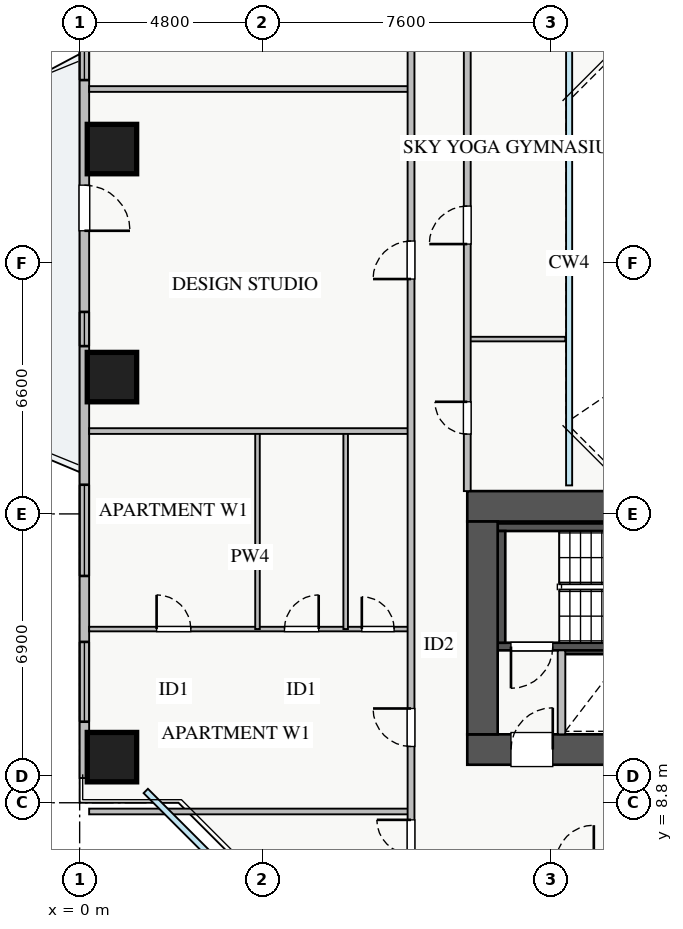
"""IFC4 building model, lengths in metres.
Left out: names, types, materials, properties, quantities, classifications, styles, units other than length and angle.
Written with IfcOpenShell. Run it as: python <this file> out.ifc"""

import sys

from ifc_helpers import new_model, si_unit, direction, frame, frame_2d, origin, origin_2d, place, context, subcontext, project, spatial, rectangle, extrude, source, transform, mapped, element, fill, save


model = new_model("IFC4")
c1 = context("Model", 3, precision=1e-05, world=origin(), true_north=direction((0.0, 1.0)))
c2 = subcontext(c1, "Body", "Model", "MODEL_VIEW")
j1 = project(units=[si_unit("LENGTHUNIT", "METRE"), si_unit("PLANEANGLEUNIT", "RADIAN")], contexts=[c1])
p1 = place(None, origin())
s1 = spatial("IfcSite", under=j1, at=p1, CompositionType="ELEMENT")
p2 = place(p1, origin())
s2 = spatial("IfcBuilding", under=s1, at=p2, CompositionType="ELEMENT")
p3 = place(p2, frame((0.0, 0.0, 89.25)))
s3 = spatial("IfcBuildingStorey", under=s2, at=p3, CompositionType="ELEMENT", Elevation=89.25)
p4 = place(p3, frame((12.68, 12.8, 0.0), z_axis=(0.0, 0.0, 1.0), x_axis=(1.0, 0.0, 0.0)))
e1 = element("IfcWall", 1, at=p4, inside=s3, PredefinedType="SHEAR", context=c2, shape_type="SweptSolid", body=[
    extrude(rectangle(XDim=1.94, YDim=0.18, at=frame_2d((0.97, 0.0))), origin(), (0.0, 0.0, 1.0), 3.03),
])
p5 = place(p3, frame((11.0, 12.91, 0.0), z_axis=(0.0, 0.0, 1.0), x_axis=(1.0, 0.0, 0.0)))
e2 = element("IfcWall", 2, at=p5, inside=s3, PredefinedType="SHEAR", context=c2, shape_type="SweptSolid", body=[
    extrude(rectangle(XDim=7.15, YDim=0.2, at=frame_2d((3.575, 0.0))), origin(), (0.0, 0.0, 1.0), 3.25),
])
p6 = place(p5, frame((0.35, 0.0, 0.0)))
e3 = element("IfcOpeningElement", 3, at=p6, cuts=e2, PredefinedType="OPENING", context=c2, shape_type="SweptSolid", body=[
    extrude(rectangle(XDim=1.1, YDim=2.05, at=frame_2d((0.55, 1.025))), frame((0.0, 0.11, 0.0), z_axis=(0.0, -1.0, 0.0), x_axis=(1.0, 0.0, 0.0)), (0.0, 0.0, 1.0), 0.22),
])
p7 = place(p3, frame((11.0, 16.05, 0.0), z_axis=(0.0, 0.0, 1.0), x_axis=(1.0, 0.0, 0.0)))
e4 = element("IfcWall", 4, at=p7, inside=s3, PredefinedType="SHEAR", context=c2, shape_type="SweptSolid", body=[
    extrude(rectangle(XDim=7.15, YDim=0.2, at=frame_2d((3.575, 0.0))), origin(), (0.0, 0.0, 1.0), 3.25),
])
p8 = place(p3, frame((11.1, 13.01, 0.0), z_axis=(0.0, 0.0, 1.0), x_axis=(0.0, 1.0, 0.0)))
e5 = element("IfcWall", 5, at=p8, inside=s3, PredefinedType="SHEAR", context=c2, shape_type="SweptSolid", body=[
    extrude(rectangle(XDim=2.94, YDim=0.2, at=frame_2d((1.47, 0.0))), origin(), (0.0, 0.0, 1.0), 3.25),
])
p9 = place(p3, frame((10.2, 10.2, 0.0), z_axis=(0.0, 0.0, 1.0), x_axis=(1.0, 0.0, 0.0)))
e6 = element("IfcWall", 6, at=p9, inside=s3, PredefinedType="SHEAR", context=c2, shape_type="SweptSolid", body=[
    extrude(rectangle(XDim=17.6, YDim=0.8, at=frame_2d((8.8, 0.0))), origin(), (0.0, 0.0, 1.0), 3.25),
])
p10 = place(p9, frame((1.15, 0.0, 0.0)))
e7 = element("IfcOpeningElement", 7, at=p10, cuts=e6, PredefinedType="OPENING", context=c2, shape_type="SweptSolid", body=[
    extrude(rectangle(XDim=1.1, YDim=2.05, at=frame_2d((0.55, 1.025))), frame((0.0, 0.41, 0.0), z_axis=(0.0, -1.0, 0.0), x_axis=(1.0, 0.0, 0.0)), (0.0, 0.0, 1.0), 0.82),
])
p11 = place(p9, frame((8.3, 0.0, 0.0)))
e8 = element("IfcOpeningElement", 8, at=p11, cuts=e6, PredefinedType="OPENING", context=c2, shape_type="SweptSolid", body=[
    extrude(rectangle(XDim=1.1, YDim=2.05, at=frame_2d((0.55, 1.025))), frame((0.0, 0.41, 0.0), z_axis=(0.0, -1.0, 0.0), x_axis=(1.0, 0.0, 0.0)), (0.0, 0.0, 1.0), 0.82),
])
p12 = place(p9, frame((10.05, 0.0, 0.0)))
e9 = element("IfcOpeningElement", 9, at=p12, cuts=e6, PredefinedType="OPENING", context=c2, shape_type="SweptSolid", body=[
    extrude(rectangle(XDim=1.1, YDim=2.05, at=frame_2d((0.55, 1.025))), frame((0.0, 0.41, 0.0), z_axis=(0.0, -1.0, 0.0), x_axis=(1.0, 0.0, 0.0)), (0.0, 0.0, 1.0), 0.82),
])
p13 = place(p9, frame((14.74, 0.0, 0.0)))
e10 = element("IfcOpeningElement", 10, at=p13, cuts=e6, PredefinedType="OPENING", context=c2, shape_type="SweptSolid", body=[
    extrude(rectangle(XDim=1.0, YDim=2.05, at=frame_2d((0.5, 1.025))), frame((0.0, 0.41, 0.0), z_axis=(0.0, -1.0, 0.0), x_axis=(1.0, 0.0, 0.0)), (0.0, 0.0, 1.0), 0.82),
])
p14 = place(p9, frame((12.585, 0.0, 0.0)))
e11 = element("IfcOpeningElement", 11, at=p14, cuts=e6, PredefinedType="OPENING", context=c2, shape_type="SweptSolid", body=[
    extrude(rectangle(XDim=1.0, YDim=2.05, at=frame_2d((0.5, 1.025))), frame((0.0, 0.41, 0.0), z_axis=(0.0, -1.0, 0.0), x_axis=(1.0, 0.0, 0.0)), (0.0, 0.0, 1.0), 0.82),
])
p15 = place(p3, frame((10.2, 16.6, 0.0), z_axis=(0.0, 0.0, 1.0), x_axis=(1.0, 0.0, 0.0)))
e12 = element("IfcWall", 12, at=p15, inside=s3, PredefinedType="SHEAR", context=c2, shape_type="SweptSolid", body=[
    extrude(rectangle(XDim=17.6, YDim=0.8, at=frame_2d((8.8, 0.0))), origin(), (0.0, 0.0, 1.0), 3.25),
])
p16 = place(p3, frame((10.6, 10.6, 0.0), z_axis=(0.0, 0.0, 1.0), x_axis=(0.0, 1.0, 0.0)))
e13 = element("IfcWall", 13, at=p16, inside=s3, PredefinedType="SHEAR", context=c2, shape_type="SweptSolid", body=[
    extrude(rectangle(XDim=5.6, YDim=0.8, at=frame_2d((2.8, 0.0))), origin(), (0.0, 0.0, 1.0), 3.25),
])
m1 = source(origin(), c2, "Body", "SweptSolid", [
    extrude(rectangle(XDim=1.3, YDim=1.3, at=origin_2d()), origin(), (0.0, 0.0, 1.0), 3.25),
])
for number, where, z_axis, x_axis in (
    (14, (0.85, 26.0, 0.0), (0.0, 0.0, 1.0), (1.0, 0.0, 0.0)),
    (15, (0.85, 20.0, 0.0), (0.0, 0.0, 1.0), (1.0, 0.0, 0.0)),
    (16, (0.85, 10.0, 0.0), (0.0, 0.0, 1.0), (1.0, 0.0, 0.0)),
):
    element("IfcColumn", number, at=place(p3, frame(where, z_axis=z_axis, x_axis=x_axis)), inside=s3, PredefinedType="COLUMN", context=c2, shape_type="MappedRepresentation", body=[
        mapped(m1, transform((0.0, 0.0, 0.0), x_axis=(1.0, 0.0, 0.0), y_axis=(0.0, 1.0, 0.0), z_axis=(0.0, 0.0, 1.0), scale=1.0)),
    ])
p17 = place(p3, frame((0.125, 9.45, 0.0), z_axis=(0.0, 0.0, 1.0), x_axis=(0.0, 1.0, 0.0)))
e17 = element("IfcWall", 17, at=p17, inside=s3, PredefinedType="STANDARD", context=c2, shape_type="SweptSolid", body=[
    extrude(rectangle(XDim=27.1, YDim=0.25, at=frame_2d((13.55, 0.0))), origin(), (0.0, 0.0, 1.0), 2.57),
])
p18 = place(p17, frame((14.4, 0.0, 0.0)))
e18 = element("IfcOpeningElement", 18, at=p18, cuts=e17, PredefinedType="OPENING", context=c2, shape_type="SweptSolid", body=[
    extrude(rectangle(XDim=1.2, YDim=2.1, at=frame_2d((0.6, 1.05))), frame((0.0, 0.135, 0.0), z_axis=(0.0, -1.0, 0.0), x_axis=(1.0, 0.0, 0.0)), (0.0, 0.0, 1.0), 0.27),
])
p19 = place(p17, frame((1.482, 0.0, 0.9)))
e19 = element("IfcOpeningElement", 19, at=p19, cuts=e17, PredefinedType="OPENING", context=c2, shape_type="SweptSolid", body=[
    extrude(rectangle(XDim=2.1, YDim=1.5, at=frame_2d((1.05, 0.75))), frame((0.0, 0.135, 0.0), z_axis=(0.0, -1.0, 0.0), x_axis=(1.0, 0.0, 0.0)), (0.0, 0.0, 1.0), 0.27),
])
p20 = place(p17, frame((23.272, 0.0, 0.9)))
e20 = element("IfcOpeningElement", 20, at=p20, cuts=e17, PredefinedType="OPENING", context=c2, shape_type="SweptSolid", body=[
    extrude(rectangle(XDim=2.1, YDim=1.5, at=frame_2d((1.05, 0.75))), frame((0.0, 0.135, 0.0), z_axis=(0.0, -1.0, 0.0), x_axis=(1.0, 0.0, 0.0)), (0.0, 0.0, 1.0), 0.27),
])
p21 = place(p17, frame((5.317, 0.0, 0.9)))
e21 = element("IfcOpeningElement", 21, at=p21, cuts=e17, PredefinedType="OPENING", context=c2, shape_type="SweptSolid", body=[
    extrude(rectangle(XDim=2.4, YDim=1.5, at=frame_2d((1.2, 0.75))), frame((0.0, 0.135, 0.0), z_axis=(0.0, -1.0, 0.0), x_axis=(1.0, 0.0, 0.0)), (0.0, 0.0, 1.0), 0.27),
])
p22 = place(p17, frame((11.365, 0.0, 0.9)))
e22 = element("IfcOpeningElement", 22, at=p22, cuts=e17, PredefinedType="OPENING", context=c2, shape_type="SweptSolid", body=[
    extrude(rectangle(XDim=0.9, YDim=1.2, at=frame_2d((0.45, 0.6))), frame((0.0, 0.135, 0.0), z_axis=(0.0, -1.0, 0.0), x_axis=(1.0, 0.0, 0.0)), (0.0, 0.0, 1.0), 0.27),
])
p23 = place(p17, frame((18.365, 0.0, 0.9)))
e23 = element("IfcOpeningElement", 23, at=p23, cuts=e17, PredefinedType="OPENING", context=c2, shape_type="SweptSolid", body=[
    extrude(rectangle(XDim=0.9, YDim=1.2, at=frame_2d((0.45, 0.6))), frame((0.0, 0.135, 0.0), z_axis=(0.0, -1.0, 0.0), x_axis=(1.0, 0.0, 0.0)), (0.0, 0.0, 1.0), 0.27),
])
p24 = place(p3, frame((12.68, 10.6, 0.0), z_axis=(0.0, 0.0, 1.0), x_axis=(0.0, 1.0, 0.0)))
e24 = element("IfcWall", 24, at=p24, inside=s3, PredefinedType="PARTITIONING", context=c2, shape_type="SweptSolid", body=[
    extrude(rectangle(XDim=2.21, YDim=0.2, at=frame_2d((1.105, 0.0))), origin(), (0.0, 0.0, 1.0), 3.03),
])
p25 = place(p3, frame((0.25, 8.57, 0.0), z_axis=(0.0, 0.0, 1.0), x_axis=(1.0, 0.0, 0.0)))
e25 = element("IfcWall", 25, at=p25, inside=s3, PredefinedType="PARTITIONING", context=c2, shape_type="SweptSolid", body=[
    extrude(rectangle(XDim=8.47, YDim=0.15, at=frame_2d((4.235, 0.0))), origin(), (0.0, 0.0, 1.0), 3.03),
])
p26 = place(p3, frame((0.25, 13.37, 0.0), z_axis=(0.0, 0.0, 1.0), x_axis=(1.0, 0.0, 0.0)))
e26 = element("IfcWall", 26, at=p26, inside=s3, PredefinedType="PLUMBINGWALL", context=c2, shape_type="SweptSolid", body=[
    extrude(rectangle(XDim=8.47, YDim=0.12, at=frame_2d((4.235, 0.0))), origin(), (0.0, 0.0, 1.0), 3.03),
])
p27 = place(p26, frame((1.775, 0.0, 0.0)))
e27 = element("IfcOpeningElement", 27, at=p27, cuts=e26, PredefinedType="OPENING", context=c2, shape_type="SweptSolid", body=[
    extrude(rectangle(XDim=0.9, YDim=2.05, at=frame_2d((0.45, 1.025))), frame((0.0, 0.07, 0.0), z_axis=(0.0, -1.0, 0.0), x_axis=(1.0, 0.0, 0.0)), (0.0, 0.0, 1.0), 0.14),
])
p28 = place(p26, frame((5.14, 0.0, 0.0)))
e28 = element("IfcOpeningElement", 28, at=p28, cuts=e26, PredefinedType="OPENING", context=c2, shape_type="SweptSolid", body=[
    extrude(rectangle(XDim=0.9, YDim=2.05, at=frame_2d((0.45, 1.025))), frame((0.0, 0.07, 0.0), z_axis=(0.0, -1.0, 0.0), x_axis=(1.0, 0.0, 0.0)), (0.0, 0.0, 1.0), 0.14),
])
p29 = place(p26, frame((7.175, 0.0, 0.0)))
e29 = element("IfcOpeningElement", 29, at=p29, cuts=e26, PredefinedType="OPENING", context=c2, shape_type="SweptSolid", body=[
    extrude(rectangle(XDim=0.85, YDim=2.05, at=frame_2d((0.425, 1.025))), frame((0.0, 0.07, 0.0), z_axis=(0.0, -1.0, 0.0), x_axis=(1.0, 0.0, 0.0)), (0.0, 0.0, 1.0), 0.14),
])
for number, where, z_axis, x_axis in (
    (30, (4.68, 13.37, 0.0), (0.0, 0.0, 1.0), (0.0, 1.0, 0.0)),
    (31, (7.0, 13.37, 0.0), (0.0, 0.0, 1.0), (0.0, 1.0, 0.0)),
):
    element("IfcWall", number, at=place(p3, frame(where, z_axis=z_axis, x_axis=x_axis)), inside=s3, PredefinedType="PLUMBINGWALL", context=c2, shape_type="SweptSolid", body=[
        extrude(rectangle(XDim=5.21, YDim=0.12, at=frame_2d((2.605, 0.0))), origin(), (0.0, 0.0, 1.0), 3.03),
    ])
p30 = place(p3, frame((0.25, 18.58, 0.0), z_axis=(0.0, 0.0, 1.0), x_axis=(1.0, 0.0, 0.0)))
e32 = element("IfcWall", 32, at=p30, inside=s3, PredefinedType="PARTITIONING", context=c2, shape_type="SweptSolid", body=[
    extrude(rectangle(XDim=8.47, YDim=0.15, at=frame_2d((4.235, 0.0))), origin(), (0.0, 0.0, 1.0), 3.03),
])
p31 = place(p3, frame((0.25, 27.58, 0.0), z_axis=(0.0, 0.0, 1.0), x_axis=(1.0, 0.0, 0.0)))
e33 = element("IfcWall", 33, at=p31, inside=s3, PredefinedType="PARTITIONING", context=c2, shape_type="SweptSolid", body=[
    extrude(rectangle(XDim=8.47, YDim=0.15, at=frame_2d((4.235, 0.0))), origin(), (0.0, 0.0, 1.0), 2.781),
])
p32 = place(p3, frame((8.72, 7.21, 0.0), z_axis=(0.0, 0.0, 1.0), x_axis=(0.0, 1.0, 0.0)))
e34 = element("IfcWall", 34, at=p32, inside=s3, PredefinedType="PARTITIONING", context=c2, shape_type="SweptSolid", body=[
    extrude(rectangle(XDim=31.23, YDim=0.18, at=frame_2d((15.615, 0.0))), origin(), (0.0, 0.0, 1.0), 3.03),
])
p33 = place(p32, frame((30.09, 0.0, 0.0)))
e35 = element("IfcOpeningElement", 35, at=p33, cuts=e34, PredefinedType="OPENING", context=c2, shape_type="SweptSolid", body=[
    extrude(rectangle(XDim=0.9, YDim=2.05, at=frame_2d((0.45, 1.025))), frame((0.0, 0.1, 0.0), z_axis=(0.0, -1.0, 0.0), x_axis=(1.0, 0.0, 0.0)), (0.0, 0.0, 1.0), 0.2),
])
p34 = place(p32, frame((0.24, 0.0, 0.0)))
e36 = element("IfcOpeningElement", 36, at=p34, cuts=e34, PredefinedType="OPENING", context=c2, shape_type="SweptSolid", body=[
    extrude(rectangle(XDim=0.9, YDim=2.05, at=frame_2d((0.45, 1.025))), frame((0.0, 0.1, 0.0), z_axis=(0.0, -1.0, 0.0), x_axis=(1.0, 0.0, 0.0)), (0.0, 0.0, 1.0), 0.2),
])
p35 = place(p32, frame((3.07, 0.0, 0.0)))
e37 = element("IfcOpeningElement", 37, at=p35, cuts=e34, PredefinedType="OPENING", context=c2, shape_type="SweptSolid", body=[
    extrude(rectangle(XDim=1.0, YDim=2.05, at=frame_2d((0.5, 1.025))), frame((0.0, 0.1, 0.0), z_axis=(0.0, -1.0, 0.0), x_axis=(1.0, 0.0, 0.0)), (0.0, 0.0, 1.0), 0.2),
])
p36 = place(p32, frame((15.37, 0.0, 0.0)))
e38 = element("IfcOpeningElement", 38, at=p36, cuts=e34, PredefinedType="OPENING", context=c2, shape_type="SweptSolid", body=[
    extrude(rectangle(XDim=1.0, YDim=2.05, at=frame_2d((0.5, 1.025))), frame((0.0, 0.1, 0.0), z_axis=(0.0, -1.0, 0.0), x_axis=(1.0, 0.0, 0.0)), (0.0, 0.0, 1.0), 0.2),
])
p37 = place(p32, frame((21.96, 0.0, 0.0)))
e39 = element("IfcOpeningElement", 39, at=p37, cuts=e34, PredefinedType="OPENING", context=c2, shape_type="SweptSolid", body=[
    extrude(rectangle(XDim=1.0, YDim=2.05, at=frame_2d((0.5, 1.025))), frame((0.0, 0.1, 0.0), z_axis=(0.0, -1.0, 0.0), x_axis=(1.0, 0.0, 0.0)), (0.0, 0.0, 1.0), 0.2),
])
p38 = place(p3, frame((10.2, 21.0, 0.0), z_axis=(0.0, 0.0, 1.0), x_axis=(1.0, 0.0, 0.0)))
e40 = element("IfcWall", 40, at=p38, inside=s3, PredefinedType="PLUMBINGWALL", context=c2, shape_type="SweptSolid", body=[
    extrude(rectangle(XDim=2.58, YDim=0.12, at=frame_2d((1.29, 0.0))), origin(), (0.0, 0.0, 1.0), 3.03),
])
p39 = place(p3, frame((10.2, 17.0, 0.0), z_axis=(0.0, 0.0, 1.0), x_axis=(0.0, 1.0, 0.0)))
e41 = element("IfcWall", 41, at=p39, inside=s3, PredefinedType="PARTITIONING", context=c2, shape_type="SweptSolid", body=[
    extrude(rectangle(XDim=12.0, YDim=0.18, at=frame_2d((6.0, 0.0))), origin(), (0.0, 0.0, 1.0), 3.03),
])
p40 = place(p39, frame((1.5, 0.0, 0.0)))
e42 = element("IfcOpeningElement", 42, at=p40, cuts=e41, PredefinedType="OPENING", context=c2, shape_type="SweptSolid", body=[
    extrude(rectangle(XDim=0.85, YDim=2.05, at=frame_2d((0.425, 1.025))), frame((0.0, 0.1, 0.0), z_axis=(0.0, -1.0, 0.0), x_axis=(1.0, 0.0, 0.0)), (0.0, 0.0, 1.0), 0.2),
])
p41 = place(p39, frame((6.5, 0.0, 0.0)))
e43 = element("IfcOpeningElement", 43, at=p41, cuts=e41, PredefinedType="OPENING", context=c2, shape_type="SweptSolid", body=[
    extrude(rectangle(XDim=1.0, YDim=2.05, at=frame_2d((0.5, 1.025))), frame((0.0, 0.1, 0.0), z_axis=(0.0, -1.0, 0.0), x_axis=(1.0, 0.0, 0.0)), (0.0, 0.0, 1.0), 0.2),
])
m2 = source(origin(), c2, "Body", "SweptSolid", [
    extrude(rectangle(XDim=1.2, YDim=2.1, at=frame_2d((0.6, 1.05))), frame((0.0, 0.025, 0.0), z_axis=(0.0, -1.0, 0.0), x_axis=(1.0, 0.0, 0.0)), (0.0, 0.0, 1.0), 0.05),
])
p42 = place(p18, frame((1.2, 0.0, 0.0), z_axis=(0.0, 0.0, 1.0), x_axis=(-1.0, 0.0, 0.0)))
e44 = element("IfcDoor", 44, at=p42, inside=s3, OperationType="SINGLE_SWING_LEFT", PredefinedType="DOOR", context=c2, shape_type="MappedRepresentation", body=[
    mapped(m2, transform((0.0, 0.0, 0.0), x_axis=(1.0, 0.0, 0.0), y_axis=(0.0, 1.0, 0.0), z_axis=(0.0, 0.0, 1.0), scale=1.0)),
])
fill(e18, e44)
m3 = source(origin(), c2, "Body", "SweptSolid", [
    extrude(rectangle(XDim=2.1, YDim=1.5, at=frame_2d((1.05, 0.75))), frame((0.0, 0.03, 0.0), z_axis=(0.0, -1.0, 0.0), x_axis=(1.0, 0.0, 0.0)), (0.0, 0.0, 1.0), 0.06),
])
p43 = place(p19, origin())
e45 = element("IfcWindow", 45, at=p43, inside=s3, PartitioningType="TRIPLE_PANEL_VERTICAL", PredefinedType="WINDOW", context=c2, shape_type="MappedRepresentation", body=[
    mapped(m3, transform((0.0, 0.0, 0.0), x_axis=(1.0, 0.0, 0.0), y_axis=(0.0, 1.0, 0.0), z_axis=(0.0, 0.0, 1.0), scale=1.0)),
])
fill(e19, e45)
m4 = source(origin(), c2, "Body", "SweptSolid", [
    extrude(rectangle(XDim=1.1, YDim=2.05, at=frame_2d((0.55, 1.025))), frame((0.0, 0.025, 0.0), z_axis=(0.0, -1.0, 0.0), x_axis=(1.0, 0.0, 0.0)), (0.0, 0.0, 1.0), 0.05),
])
p44 = place(p10, origin())
e46 = element("IfcDoor", 46, at=p44, inside=s3, OperationType="SINGLE_SWING_RIGHT", PredefinedType="DOOR", context=c2, shape_type="MappedRepresentation", body=[
    mapped(m4, transform((0.0, 0.0, 0.0), x_axis=(1.0, 0.0, 0.0), y_axis=(0.0, 1.0, 0.0), z_axis=(0.0, 0.0, 1.0), scale=1.0)),
])
fill(e7, e46)
p45 = place(p6, frame((1.1, 0.0, 0.0), z_axis=(0.0, 0.0, 1.0), x_axis=(-1.0, 0.0, 0.0)))
e47 = element("IfcDoor", 47, at=p45, inside=s3, OperationType="SINGLE_SWING_LEFT", PredefinedType="DOOR", context=c2, shape_type="MappedRepresentation", body=[
    mapped(m4, transform((0.0, 0.0, 0.0), x_axis=(1.0, 0.0, 0.0), y_axis=(0.0, 1.0, 0.0), z_axis=(0.0, 0.0, 1.0), scale=1.0)),
])
fill(e3, e47)
m5 = source(origin(), c2, "Body", "SweptSolid", [
    extrude(rectangle(XDim=0.9, YDim=2.05, at=frame_2d((0.45, 1.025))), frame((0.0, 0.025, 0.0), z_axis=(0.0, -1.0, 0.0), x_axis=(1.0, 0.0, 0.0)), (0.0, 0.0, 1.0), 0.05),
])
p46 = place(p27, origin())
e48 = element("IfcDoor", 48, at=p46, inside=s3, OperationType="SINGLE_SWING_LEFT", PredefinedType="DOOR", context=c2, shape_type="MappedRepresentation", body=[
    mapped(m5, transform((0.0, 0.0, 0.0), x_axis=(1.0, 0.0, 0.0), y_axis=(0.0, 1.0, 0.0), z_axis=(0.0, 0.0, 1.0), scale=1.0)),
])
fill(e27, e48)
p47 = place(p28, origin())
e49 = element("IfcDoor", 49, at=p47, inside=s3, OperationType="SINGLE_SWING_RIGHT", PredefinedType="DOOR", context=c2, shape_type="MappedRepresentation", body=[
    mapped(m5, transform((0.0, 0.0, 0.0), x_axis=(1.0, 0.0, 0.0), y_axis=(0.0, 1.0, 0.0), z_axis=(0.0, 0.0, 1.0), scale=1.0)),
])
fill(e28, e49)
m6 = source(origin(), c2, "Body", "SweptSolid", [
    extrude(rectangle(XDim=0.85, YDim=2.05, at=frame_2d((0.425, 1.025))), frame((0.0, 0.025, 0.0), z_axis=(0.0, -1.0, 0.0), x_axis=(1.0, 0.0, 0.0)), (0.0, 0.0, 1.0), 0.05),
])
p48 = place(p29, origin())
e50 = element("IfcDoor", 50, at=p48, inside=s3, OperationType="SINGLE_SWING_LEFT", PredefinedType="DOOR", context=c2, shape_type="MappedRepresentation", body=[
    mapped(m6, transform((0.0, 0.0, 0.0), x_axis=(1.0, 0.0, 0.0), y_axis=(0.0, 1.0, 0.0), z_axis=(0.0, 0.0, 1.0), scale=1.0)),
])
fill(e29, e50)
p49 = place(p34, origin())
e51 = element("IfcDoor", 51, at=p49, inside=s3, OperationType="SINGLE_SWING_RIGHT", PredefinedType="DOOR", context=c2, shape_type="MappedRepresentation", body=[
    mapped(m5, transform((0.0, 0.0, 0.0), x_axis=(1.0, 0.0, 0.0), y_axis=(0.0, 1.0, 0.0), z_axis=(0.0, 0.0, 1.0), scale=1.0)),
])
fill(e36, e51)
m7 = source(origin(), c2, "Body", "SweptSolid", [
    extrude(rectangle(XDim=1.0, YDim=2.05, at=frame_2d((0.5, 1.025))), frame((0.0, 0.025, 0.0), z_axis=(0.0, -1.0, 0.0), x_axis=(1.0, 0.0, 0.0)), (0.0, 0.0, 1.0), 0.05),
])
p50 = place(p35, origin())
e52 = element("IfcDoor", 52, at=p50, inside=s3, OperationType="SINGLE_SWING_RIGHT", PredefinedType="DOOR", context=c2, shape_type="MappedRepresentation", body=[
    mapped(m7, transform((0.0, 0.0, 0.0), x_axis=(1.0, 0.0, 0.0), y_axis=(0.0, 1.0, 0.0), z_axis=(0.0, 0.0, 1.0), scale=1.0)),
])
fill(e37, e52)
p51 = place(p36, origin())
e53 = element("IfcDoor", 53, at=p51, inside=s3, OperationType="SINGLE_SWING_LEFT", PredefinedType="DOOR", context=c2, shape_type="MappedRepresentation", body=[
    mapped(m7, transform((0.0, 0.0, 0.0), x_axis=(1.0, 0.0, 0.0), y_axis=(0.0, 1.0, 0.0), z_axis=(0.0, 0.0, 1.0), scale=1.0)),
])
fill(e38, e53)
p52 = place(p40, origin())
e54 = element("IfcDoor", 54, at=p52, inside=s3, OperationType="SINGLE_SWING_RIGHT", PredefinedType="DOOR", context=c2, shape_type="MappedRepresentation", body=[
    mapped(m6, transform((0.0, 0.0, 0.0), x_axis=(1.0, 0.0, 0.0), y_axis=(0.0, 1.0, 0.0), z_axis=(0.0, 0.0, 1.0), scale=1.0)),
])
fill(e42, e54)
p53 = place(p41, origin())
e55 = element("IfcDoor", 55, at=p53, inside=s3, OperationType="SINGLE_SWING_LEFT", PredefinedType="DOOR", context=c2, shape_type="MappedRepresentation", body=[
    mapped(m7, transform((0.0, 0.0, 0.0), x_axis=(1.0, 0.0, 0.0), y_axis=(0.0, 1.0, 0.0), z_axis=(0.0, 0.0, 1.0), scale=1.0)),
])
fill(e43, e55)
m8 = source(origin(), c2, "Body", "SweptSolid", [
    extrude(rectangle(XDim=2.4, YDim=1.5, at=frame_2d((1.2, 0.75))), frame((0.0, 0.03, 0.0), z_axis=(0.0, -1.0, 0.0), x_axis=(1.0, 0.0, 0.0)), (0.0, 0.0, 1.0), 0.06),
])
p54 = place(p21, origin())
e56 = element("IfcWindow", 56, at=p54, inside=s3, PartitioningType="TRIPLE_PANEL_VERTICAL", PredefinedType="WINDOW", context=c2, shape_type="MappedRepresentation", body=[
    mapped(m8, transform((0.0, 0.0, 0.0), x_axis=(1.0, 0.0, 0.0), y_axis=(0.0, 1.0, 0.0), z_axis=(0.0, 0.0, 1.0), scale=1.0)),
])
fill(e21, e56)
m9 = source(origin(), c2, "Body", "SweptSolid", [
    extrude(rectangle(XDim=0.9, YDim=1.2, at=frame_2d((0.45, 0.6))), frame((0.0, 0.03, 0.0), z_axis=(0.0, -1.0, 0.0), x_axis=(1.0, 0.0, 0.0)), (0.0, 0.0, 1.0), 0.06),
])
p55 = place(p22, origin())
e57 = element("IfcWindow", 57, at=p55, inside=s3, PartitioningType="SINGLE_PANEL", PredefinedType="WINDOW", context=c2, shape_type="MappedRepresentation", body=[
    mapped(m9, transform((0.0, 0.0, 0.0), x_axis=(1.0, 0.0, 0.0), y_axis=(0.0, 1.0, 0.0), z_axis=(0.0, 0.0, 1.0), scale=1.0)),
])
fill(e22, e57)
p56 = place(p23, origin())
e58 = element("IfcWindow", 58, at=p56, inside=s3, PartitioningType="SINGLE_PANEL", PredefinedType="WINDOW", context=c2, shape_type="MappedRepresentation", body=[
    mapped(m9, transform((0.0, 0.0, 0.0), x_axis=(1.0, 0.0, 0.0), y_axis=(0.0, 1.0, 0.0), z_axis=(0.0, 0.0, 1.0), scale=1.0)),
])
fill(e23, e58)
save(model, sys.argv[1])
